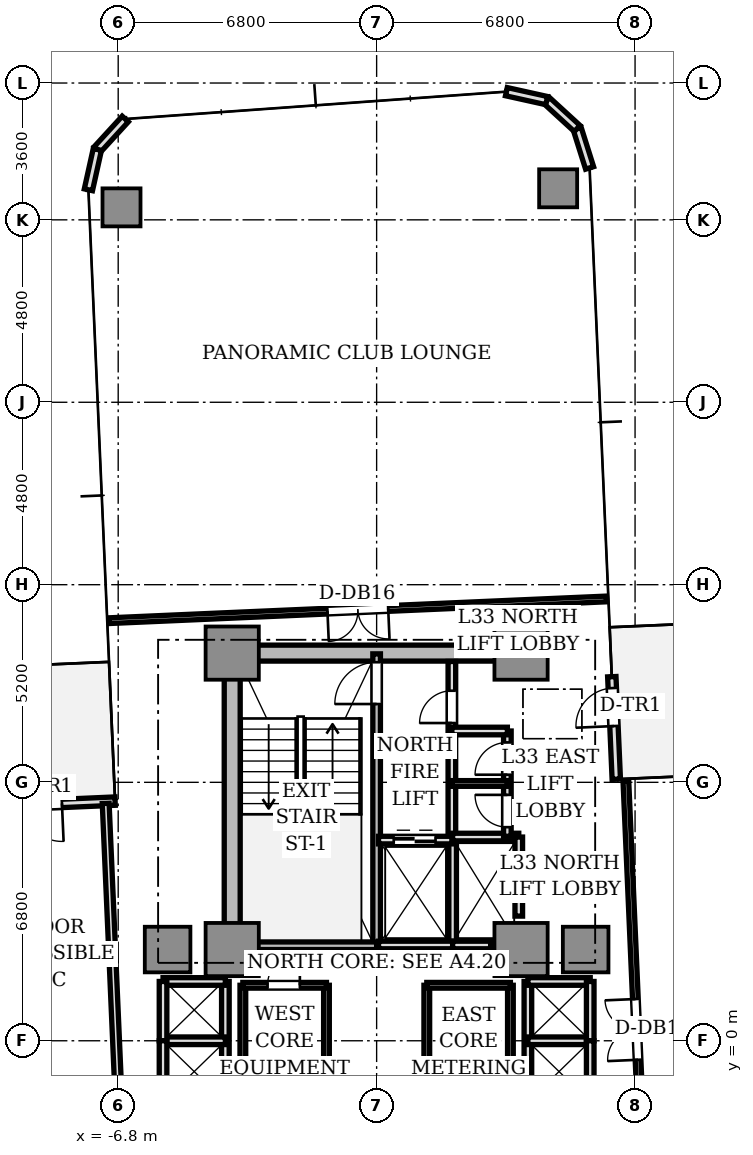
"""IFC4 building model, lengths in metres.
Left out: names, types, materials, properties, quantities, classifications, styles, units other than length and angle.
Written with IfcOpenShell. Run it as: python <this file> out.ifc"""

import sys

from ifc_helpers import new_model, si_unit, direction, frame, frame_2d, origin, origin_2d, place, context, subcontext, project, spatial, rectangle, extrude, source, transform, mapped, element, fill, save


model = new_model("IFC4")
c1 = context("Model", 3, precision=1e-05, world=origin(), true_north=direction((0.0, 1.0)))
c2 = subcontext(c1, "Body", "Model", "MODEL_VIEW")
j1 = project(units=[si_unit("LENGTHUNIT", "METRE"), si_unit("PLANEANGLEUNIT", "RADIAN")], contexts=[c1])
p1 = place(None, origin())
s1 = spatial("IfcSite", under=j1, at=p1, CompositionType="ELEMENT")
p2 = place(p1, origin())
s2 = spatial("IfcBuilding", under=s1, at=p2, CompositionType="ELEMENT")
p3 = place(p2, frame((0.0, 0.0, 121.5)))
s3 = spatial("IfcBuildingStorey", under=s2, at=p3, CompositionType="ELEMENT", Elevation=121.5)
p4 = place(p3, frame((-3.55, 10.2, 0.0), z_axis=(0.0, 0.0, 1.0), x_axis=(1.0, 0.0, 0.0)))
e1 = element("IfcWall", 1, at=p4, inside=s3, PredefinedType="SHEAR", context=c2, shape_type="SweptSolid", body=[
    extrude(rectangle(XDim=7.1, YDim=0.42, at=frame_2d((3.55, 0.0))), origin(), (0.0, 0.0, 1.0), 3.11),
])
p5 = place(p3, frame((-3.8, 2.85, 0.0), z_axis=(0.0, 0.0, 1.0), x_axis=(0.0, 1.0, 0.0)))
e2 = element("IfcWall", 2, at=p5, inside=s3, PredefinedType="SHEAR", context=c2, shape_type="SweptSolid", body=[
    extrude(rectangle(XDim=6.9, YDim=0.42, at=frame_2d((3.45, 0.0))), origin(), (0.0, 0.0, 1.0), 3.11),
])
m1 = source(origin(), c2, "Body", "SweptSolid", [
    extrude(rectangle(XDim=1.4, YDim=1.4, at=origin_2d()), origin(), (0.0, 0.0, 1.0), 3.11),
])
for number, where, z_axis, x_axis in (
    (3, (-3.8, 2.4, 0.0), (0.0, 0.0, 1.0), (1.0, 0.0, 0.0)),
    (4, (3.8, 2.4, 0.0), (0.0, 0.0, 1.0), (1.0, 0.0, 0.0)),
    (5, (-3.8, 10.2, 0.0), (0.0, 0.0, 1.0), (1.0, 0.0, 0.0)),
    (6, (3.8, 10.2, 0.0), (0.0, 0.0, 1.0), (1.0, 0.0, 0.0)),
):
    element("IfcColumn", number, at=place(p3, frame(where, z_axis=z_axis, x_axis=x_axis)), inside=s3, PredefinedType="COLUMN", context=c2, shape_type="MappedRepresentation", body=[
        mapped(m1, transform((0.0, 0.0, 0.0), scale=1.0)),
    ])
m2 = source(origin(), c2, "Body", "SweptSolid", [
    extrude(rectangle(XDim=1.2, YDim=1.2, at=origin_2d()), origin(), (0.0, 0.0, 1.0), 3.11),
])
for number, where, z_axis, x_axis in (
    (7, (5.5, 2.4, 0.0), (0.0, 0.0, 1.0), (1.0, 0.0, 0.0)),
    (8, (-5.5, 2.4, 0.0), (0.0, 0.0, 1.0), (1.0, 0.0, 0.0)),
):
    element("IfcColumn", number, at=place(p3, frame(where, z_axis=z_axis, x_axis=x_axis)), inside=s3, PredefinedType="COLUMN", context=c2, shape_type="MappedRepresentation", body=[
        mapped(m2, transform((0.0, 0.0, 0.0), scale=1.0)),
    ])
m3 = source(origin(), c2, "Body", "SweptSolid", [
    extrude(rectangle(XDim=1.0, YDim=1.0, at=origin_2d()), origin(), (0.0, 0.0, 1.0), 3.11),
])
for number, where, z_axis, x_axis in (
    (9, (4.776, 22.43, 0.0), (0.0, 0.0, 1.0), (1.0, 0.0, 0.0)),
    (10, (-6.713, 21.928, 0.0), (0.0, 0.0, 1.0), (1.0, 0.0, 0.0)),
):
    element("IfcColumn", number, at=place(p3, frame(where, z_axis=z_axis, x_axis=x_axis)), inside=s3, PredefinedType="COLUMN", context=c2, shape_type="MappedRepresentation", body=[
        mapped(m3, transform((0.0, 0.0, 0.0), scale=1.0)),
    ])
p6 = place(p3, frame((6.306, 6.882, 0.0), z_axis=(0.0, 0.0, 1.0), x_axis=(-0.043672655174, 0.999045894436, 0.0)))
e11 = element("IfcWall", 11, at=p6, inside=s3, PredefinedType="STANDARD", context=c2, shape_type="SweptSolid", body=[
    extrude(rectangle(XDim=2.7, YDim=0.22, at=frame_2d((1.35, 0.0))), origin(), (0.0, 0.0, 1.0), 3.11),
])
p7 = place(p6, frame((1.4, 0.0, 0.0)))
e12 = element("IfcOpeningElement", 12, at=p7, cuts=e11, PredefinedType="OPENING", context=c2, shape_type="SweptSolid", body=[
    extrude(rectangle(XDim=1.0, YDim=2.2, at=frame_2d((0.5, 1.1))), frame((0.0, 0.12, 0.0), z_axis=(0.0, -1.0, 0.0), x_axis=(1.0, 0.0, 0.0)), (0.0, 0.0, 1.0), 0.24),
])
p8 = place(p3, frame((5.604, 22.966, 0.0), z_axis=(0.0, 0.0, 1.0), x_axis=(-0.300755105707, 0.953701403161, 0.0)))
e13 = element("IfcWall", 13, at=p8, inside=s3, PredefinedType="STANDARD", context=c2, shape_type="SweptSolid", body=[
    extrude(rectangle(XDim=1.087, YDim=0.22, at=frame_2d((0.543, 0.0))), origin(), (0.0, 0.0, 1.0), 3.11),
])
p9 = place(p3, frame((5.277, 24.003, 0.0), z_axis=(0.0, 0.0, 1.0), x_axis=(-0.737312600672, 0.675551721847, 0.0)))
e14 = element("IfcWall", 14, at=p9, inside=s3, PredefinedType="STANDARD", context=c2, shape_type="SweptSolid", body=[
    extrude(rectangle(XDim=1.087, YDim=0.22, at=frame_2d((0.543, 0.0))), origin(), (0.0, 0.0, 1.0), 3.11),
])
for number, where, z_axis, x_axis in (
    (15, (4.475, 24.737, 0.0), (0.0, 0.0, 1.0), (-0.976, 0.217, 0.0)),
    (16, (-6.614, 24.253, 0.0), (0.0, 0.0, 1.0), (-0.676, -0.737, 0.0)),
):
    element("IfcWall", number, at=place(p3, frame(where, z_axis=z_axis, x_axis=x_axis)), inside=s3, PredefinedType="STANDARD", context=c2, shape_type="SweptSolid", body=[
        extrude(rectangle(XDim=1.087, YDim=0.22, at=frame_2d((0.543, 0.0))), origin(), (0.0, 0.0, 1.0), 3.11),
    ])
p10 = place(p3, frame((-7.349, 23.452, 0.0), z_axis=(0.0, 0.0, 1.0), x_axis=(-0.216454939174, -0.976292609471, 0.0)))
e17 = element("IfcWall", 17, at=p10, inside=s3, PredefinedType="STANDARD", context=c2, shape_type="SweptSolid", body=[
    extrude(rectangle(XDim=1.087, YDim=0.22, at=frame_2d((0.544, 0.0))), origin(), (0.0, 0.0, 1.0), 3.11),
])
p11 = place(p3, frame((-6.882, 6.306, 0.0), z_axis=(0.0, 0.0, 1.0), x_axis=(-0.999045894436, -0.043672655174, 0.0)))
e18 = element("IfcWall", 18, at=p11, inside=s3, PredefinedType="STANDARD", context=c2, shape_type="SweptSolid", body=[
    extrude(rectangle(XDim=2.7, YDim=0.22, at=frame_2d((1.35, 0.0))), origin(), (0.0, 0.0, 1.0), 3.11),
])
p12 = place(p11, frame((1.4, 0.0, 0.0)))
e19 = element("IfcOpeningElement", 19, at=p12, cuts=e18, PredefinedType="OPENING", context=c2, shape_type="SweptSolid", body=[
    extrude(rectangle(XDim=1.0, YDim=2.2, at=frame_2d((0.5, 1.1))), frame((0.0, 0.12, 0.0), z_axis=(0.0, -1.0, 0.0), x_axis=(1.0, 0.0, 0.0)), (0.0, 0.0, 1.0), 0.24),
])
p13 = place(p3, frame((0.0, 2.5, 0.0), z_axis=(0.0, 0.0, 1.0), x_axis=(0.0, 1.0, 0.0)))
e20 = element("IfcWall", 20, at=p13, inside=s3, PredefinedType="SOLIDWALL", context=c2, shape_type="SweptSolid", body=[
    extrude(rectangle(XDim=7.68, YDim=0.2, at=frame_2d((3.84, 0.0))), origin(), (0.0, 0.0, 1.0), 3.11),
])
p14 = place(p13, frame((6.36, 0.0, 0.0)))
e21 = element("IfcOpeningElement", 21, at=p14, cuts=e20, PredefinedType="OPENING", context=c2, shape_type="SweptSolid", body=[
    extrude(rectangle(XDim=1.1, YDim=2.15, at=frame_2d((0.55, 1.075))), frame((0.0, 0.11, 0.0), z_axis=(0.0, -1.0, 0.0), x_axis=(1.0, 0.0, 0.0)), (0.0, 0.0, 1.0), 0.22),
])
p15 = place(p3, frame((-3.72, 2.5, 0.0), z_axis=(0.0, 0.0, 1.0), x_axis=(1.0, 0.0, 0.0)))
e22 = element("IfcWall", 22, at=p15, inside=s3, PredefinedType="SOLIDWALL", context=c2, shape_type="SweptSolid", body=[
    extrude(rectangle(XDim=3.72, YDim=0.2, at=frame_2d((1.86, 0.0))), origin(), (0.0, 0.0, 1.0), 3.11),
])
p16 = place(p3, frame((1.98, 5.32, 0.0), z_axis=(0.0, 0.0, 1.0), x_axis=(0.0, 1.0, 0.0)))
e23 = element("IfcWall", 23, at=p16, inside=s3, PredefinedType="SOLIDWALL", context=c2, shape_type="SweptSolid", body=[
    extrude(rectangle(XDim=4.66, YDim=0.2, at=frame_2d((2.33, 0.0))), origin(), (0.0, 0.0, 1.0), 2.66),
])
p17 = place(p16, frame((3.04, 0.0, 0.0)))
e24 = element("IfcOpeningElement", 24, at=p17, cuts=e23, PredefinedType="OPENING", context=c2, shape_type="SweptSolid", body=[
    extrude(rectangle(XDim=0.85, YDim=2.1, at=frame_2d((0.425, 1.05))), frame((0.0, 0.11, 0.0), z_axis=(0.0, -1.0, 0.0), x_axis=(1.0, 0.0, 0.0)), (0.0, 0.0, 1.0), 0.22),
])
p18 = place(p3, frame((2.0, 2.5, 0.0), z_axis=(0.0, 0.0, 1.0), x_axis=(0.0, 1.0, 0.0)))
e25 = element("IfcWall", 25, at=p18, inside=s3, PredefinedType="SOLIDWALL", context=c2, shape_type="SweptSolid", body=[
    extrude(rectangle(XDim=2.78, YDim=0.2, at=frame_2d((1.39, 0.0))), origin(), (0.0, 0.0, 1.0), 2.66),
])
p19 = place(p3, frame((0.05, 2.52, 0.0), z_axis=(0.0, 0.0, 1.0), x_axis=(1.0, 0.0, 0.0)))
e26 = element("IfcWall", 26, at=p19, inside=s3, PredefinedType="SOLIDWALL", context=c2, shape_type="SweptSolid", body=[
    extrude(rectangle(XDim=1.95, YDim=0.2, at=frame_2d((0.975, 0.0))), origin(), (0.0, 0.0, 1.0), 2.66),
])
p20 = place(p3, frame((0.05, 5.28, 0.0), z_axis=(0.0, 0.0, 1.0), x_axis=(1.0, 0.0, 0.0)))
e27 = element("IfcWall", 27, at=p20, inside=s3, PredefinedType="SOLIDWALL", context=c2, shape_type="SweptSolid", body=[
    extrude(rectangle(XDim=1.93, YDim=0.2, at=frame_2d((0.965, 0.0))), origin(), (0.0, 0.0, 1.0), 2.66),
])
p21 = place(p20, frame((0.4, 0.0, 0.0)))
e28 = element("IfcOpeningElement", 28, at=p21, cuts=e27, PredefinedType="OPENING", context=c2, shape_type="SweptSolid", body=[
    extrude(rectangle(XDim=1.1, YDim=2.2, at=frame_2d((0.55, 1.1))), frame((0.0, 0.11, 0.0), z_axis=(0.0, -1.0, 0.0), x_axis=(1.0, 0.0, 0.0)), (0.0, 0.0, 1.0), 0.22),
])
p22 = place(p3, frame((2.0, 2.52, 0.0), z_axis=(0.0, 0.0, 1.0), x_axis=(1.0, 0.0, 0.0)))
e29 = element("IfcWall", 29, at=p22, inside=s3, PredefinedType="SOLIDWALL", context=c2, shape_type="SweptSolid", body=[
    extrude(rectangle(XDim=1.0, YDim=0.2, at=frame_2d((0.5, 0.0))), origin(), (0.0, 0.0, 1.0), 2.66),
])
p23 = place(p3, frame((2.0, 5.36, 0.0), z_axis=(0.0, 0.0, 1.0), x_axis=(1.0, 0.0, 0.0)))
e30 = element("IfcWall", 30, at=p23, inside=s3, PredefinedType="SOLIDWALL", context=c2, shape_type="SweptSolid", body=[
    extrude(rectangle(XDim=1.74, YDim=0.2, at=frame_2d((0.87, 0.0))), origin(), (0.0, 0.0, 1.0), 2.66),
])
p24 = place(p3, frame((3.74, 3.28, 0.0), z_axis=(0.0, 0.0, 1.0), x_axis=(0.0, 1.0, 0.0)))
e31 = element("IfcWall", 31, at=p24, inside=s3, PredefinedType="SOLIDWALL", context=c2, shape_type="SweptSolid", body=[
    extrude(rectangle(XDim=2.08, YDim=0.2, at=frame_2d((1.04, 0.0))), origin(), (0.0, 0.0, 1.0), 2.66),
])
p25 = place(p24, frame((0.44, 0.0, 0.0)))
e32 = element("IfcOpeningElement", 32, at=p25, cuts=e31, PredefinedType="OPENING", context=c2, shape_type="SweptSolid", body=[
    extrude(rectangle(XDim=1.2, YDim=2.2, at=frame_2d((0.6, 1.1))), frame((0.0, 0.11, 0.0), z_axis=(0.0, -1.0, 0.0), x_axis=(1.0, 0.0, 0.0)), (0.0, 0.0, 1.0), 0.22),
])
p26 = place(p3, frame((3.98, -1.56, 0.0), z_axis=(0.0, 0.0, 1.0), x_axis=(0.0, 1.0, 0.0)))
e33 = element("IfcWall", 33, at=p26, inside=s3, PredefinedType="SOLIDWALL", context=c2, shape_type="SweptSolid", body=[
    extrude(rectangle(XDim=3.12, YDim=0.2, at=frame_2d((1.56, 0.0))), origin(), (0.0, 0.0, 1.0), 2.28),
])
for number, where, z_axis, x_axis in (
    (34, (3.98, 1.56, 0.0), (0.0, 0.0, 1.0), (1.0, 0.0, 0.0)),
    (35, (3.98, 0.0, 0.0), (0.0, 0.0, 1.0), (1.0, 0.0, 0.0)),
):
    element("IfcWall", number, at=place(p3, frame(where, z_axis=z_axis, x_axis=x_axis)), inside=s3, PredefinedType="SOLIDWALL", context=c2, shape_type="SweptSolid", body=[
        extrude(rectangle(XDim=1.64, YDim=0.2, at=frame_2d((0.82, 0.0))), origin(), (0.0, 0.0, 1.0), 2.66),
    ])
for number, where, z_axis, x_axis in (
    (36, (5.62, 0.0, 0.0), (0.0, 0.0, 1.0), (0.0, 1.0, 0.0)),
    (37, (5.62, -1.56, 0.0), (0.0, 0.0, 1.0), (0.0, 1.0, 0.0)),
):
    element("IfcWall", number, at=place(p3, frame(where, z_axis=z_axis, x_axis=x_axis)), inside=s3, PredefinedType="SOLIDWALL", context=c2, shape_type="SweptSolid", body=[
        extrude(rectangle(XDim=1.56, YDim=0.2, at=frame_2d((0.78, 0.0))), origin(), (0.0, 0.0, 1.0), 2.66),
    ])
p27 = place(p3, frame((-3.98, -1.56, 0.0), z_axis=(0.0, 0.0, 1.0), x_axis=(0.0, 1.0, 0.0)))
e38 = element("IfcWall", 38, at=p27, inside=s3, PredefinedType="SOLIDWALL", context=c2, shape_type="SweptSolid", body=[
    extrude(rectangle(XDim=3.12, YDim=0.2, at=frame_2d((1.56, 0.0))), origin(), (0.0, 0.0, 1.0), 2.28),
])
for number, where, z_axis, x_axis in (
    (39, (-5.62, 1.56, 0.0), (0.0, 0.0, 1.0), (1.0, 0.0, 0.0)),
    (40, (-5.62, 0.0, 0.0), (0.0, 0.0, 1.0), (1.0, 0.0, 0.0)),
):
    element("IfcWall", number, at=place(p3, frame(where, z_axis=z_axis, x_axis=x_axis)), inside=s3, PredefinedType="SOLIDWALL", context=c2, shape_type="SweptSolid", body=[
        extrude(rectangle(XDim=1.64, YDim=0.2, at=frame_2d((0.82, 0.0))), origin(), (0.0, 0.0, 1.0), 2.66),
    ])
for number, where, z_axis, x_axis in (
    (41, (-5.62, 0.0, 0.0), (0.0, 0.0, 1.0), (0.0, 1.0, 0.0)),
    (42, (-5.62, -1.56, 0.0), (0.0, 0.0, 1.0), (0.0, 1.0, 0.0)),
):
    element("IfcWall", number, at=place(p3, frame(where, z_axis=z_axis, x_axis=x_axis)), inside=s3, PredefinedType="SOLIDWALL", context=c2, shape_type="SweptSolid", body=[
        extrude(rectangle(XDim=1.56, YDim=0.2, at=frame_2d((0.78, 0.0))), origin(), (0.0, 0.0, 1.0), 2.66),
    ])
p28 = place(p3, frame((3.44, 5.38, 0.0), z_axis=(0.0, 0.0, 1.0), x_axis=(0.0, 1.0, 0.0)))
e43 = element("IfcWall", 43, at=p28, inside=s3, PredefinedType="SOLIDWALL", context=c2, shape_type="SweptSolid", body=[
    extrude(rectangle(XDim=2.77, YDim=0.2, at=frame_2d((1.385, 0.0))), origin(), (0.0, 0.0, 1.0), 2.66),
])
p29 = place(p28, frame((0.24, 0.0, 0.0)))
e44 = element("IfcOpeningElement", 44, at=p29, cuts=e43, PredefinedType="OPENING", context=c2, shape_type="SweptSolid", body=[
    extrude(rectangle(XDim=0.85, YDim=2.1, at=frame_2d((0.425, 1.05))), frame((0.0, 0.11, 0.0), z_axis=(0.0, -1.0, 0.0), x_axis=(1.0, 0.0, 0.0)), (0.0, 0.0, 1.0), 0.22),
])
p30 = place(p28, frame((1.62, 0.0, 0.0)))
e45 = element("IfcOpeningElement", 45, at=p30, cuts=e43, PredefinedType="OPENING", context=c2, shape_type="SweptSolid", body=[
    extrude(rectangle(XDim=0.85, YDim=2.1, at=frame_2d((0.425, 1.05))), frame((0.0, 0.11, 0.0), z_axis=(0.0, -1.0, 0.0), x_axis=(1.0, 0.0, 0.0)), (0.0, 0.0, 1.0), 0.22),
])
p31 = place(p3, frame((1.98, 8.15, 0.0), z_axis=(0.0, 0.0, 1.0), x_axis=(1.0, 0.0, 0.0)))
e46 = element("IfcWall", 46, at=p31, inside=s3, PredefinedType="SOLIDWALL", context=c2, shape_type="SweptSolid", body=[
    extrude(rectangle(XDim=1.46, YDim=0.2, at=frame_2d((0.73, 0.0))), origin(), (0.0, 0.0, 1.0), 2.66),
])
p32 = place(p3, frame((1.98, 6.77, 0.0), z_axis=(0.0, 0.0, 1.0), x_axis=(1.0, 0.0, 0.0)))
e47 = element("IfcWall", 47, at=p32, inside=s3, PredefinedType="PARTITIONING", context=c2, shape_type="SweptSolid", body=[
    extrude(rectangle(XDim=1.46, YDim=0.15, at=frame_2d((0.73, 0.0))), origin(), (0.0, 0.0, 1.0), 2.66),
])
p33 = place(p3, frame((-1.32, -1.46, 0.0), z_axis=(0.0, 0.0, 1.0), x_axis=(0.0, 1.0, 0.0)))
e48 = element("IfcWall", 48, at=p33, inside=s3, PredefinedType="PARTITIONING", context=c2, shape_type="SweptSolid", body=[
    extrude(rectangle(XDim=2.92, YDim=0.15, at=frame_2d((1.46, 0.0))), origin(), (0.0, 0.0, 1.0), 2.66),
])
p34 = place(p3, frame((-3.52, -1.46, 0.0), z_axis=(0.0, 0.0, 1.0), x_axis=(0.0, 1.0, 0.0)))
e49 = element("IfcWall", 49, at=p34, inside=s3, PredefinedType="PARTITIONING", context=c2, shape_type="SweptSolid", body=[
    extrude(rectangle(XDim=2.92, YDim=0.15, at=frame_2d((1.46, 0.0))), origin(), (0.0, 0.0, 1.0), 2.28),
])
p35 = place(p3, frame((-3.52, 1.46, 0.0), z_axis=(0.0, 0.0, 1.0), x_axis=(1.0, 0.0, 0.0)))
e50 = element("IfcWall", 50, at=p35, inside=s3, PredefinedType="PARTITIONING", context=c2, shape_type="SweptSolid", body=[
    extrude(rectangle(XDim=2.2, YDim=0.15, at=frame_2d((1.1, 0.0))), origin(), (0.0, 0.0, 1.0), 2.66),
])
p36 = place(p35, frame((0.65, 0.0, 0.0)))
e51 = element("IfcOpeningElement", 51, at=p36, cuts=e50, PredefinedType="OPENING", context=c2, shape_type="SweptSolid", body=[
    extrude(rectangle(XDim=0.85, YDim=2.1, at=frame_2d((0.425, 1.05))), frame((0.0, 0.085, 0.0), z_axis=(0.0, -1.0, 0.0), x_axis=(1.0, 0.0, 0.0)), (0.0, 0.0, 1.0), 0.17),
])
p37 = place(p3, frame((1.32, -1.46, 0.0), z_axis=(0.0, 0.0, 1.0), x_axis=(0.0, 1.0, 0.0)))
e52 = element("IfcWall", 52, at=p37, inside=s3, PredefinedType="PARTITIONING", context=c2, shape_type="SweptSolid", body=[
    extrude(rectangle(XDim=2.92, YDim=0.15, at=frame_2d((1.46, 0.0))), origin(), (0.0, 0.0, 1.0), 2.66),
])
p38 = place(p3, frame((3.52, -1.46, 0.0), z_axis=(0.0, 0.0, 1.0), x_axis=(0.0, 1.0, 0.0)))
e53 = element("IfcWall", 53, at=p38, inside=s3, PredefinedType="PARTITIONING", context=c2, shape_type="SweptSolid", body=[
    extrude(rectangle(XDim=2.92, YDim=0.15, at=frame_2d((1.46, 0.0))), origin(), (0.0, 0.0, 1.0), 2.28),
])
p39 = place(p3, frame((1.32, 1.46, 0.0), z_axis=(0.0, 0.0, 1.0), x_axis=(1.0, 0.0, 0.0)))
e54 = element("IfcWall", 54, at=p39, inside=s3, PredefinedType="PARTITIONING", context=c2, shape_type="SweptSolid", body=[
    extrude(rectangle(XDim=2.2, YDim=0.15, at=frame_2d((1.1, 0.0))), origin(), (0.0, 0.0, 1.0), 2.66),
])
p40 = place(p3, frame((7.129, -6.245, 0.0), z_axis=(0.0, 0.0, 1.0), x_axis=(-0.043609488494, 0.999048653727, 0.0)))
e55 = element("IfcWall", 55, at=p40, inside=s3, PredefinedType="PARTITIONING", context=c2, shape_type="SweptSolid", body=[
    extrude(rectangle(XDim=13.1, YDim=0.15, at=frame_2d((6.55, 0.0))), origin(), (0.0, 0.0, 1.0), 2.66),
])
p41 = place(p40, frame((5.75, 0.0, 0.0)))
e56 = element("IfcOpeningElement", 56, at=p41, cuts=e55, PredefinedType="OPENING", context=c2, shape_type="SweptSolid", body=[
    extrude(rectangle(XDim=1.6, YDim=2.25, at=frame_2d((0.8, 1.125))), frame((0.0, 0.085, 0.0), z_axis=(0.0, -1.0, 0.0), x_axis=(1.0, 0.0, 0.0)), (0.0, 0.0, 1.0), 0.17),
])
p42 = place(p3, frame((6.049, 11.625, 0.0), z_axis=(0.0, 0.0, 1.0), x_axis=(-0.999047806124, -0.043628901879, 0.0)))
e57 = element("IfcWall", 57, at=p42, inside=s3, PredefinedType="PARTITIONING", context=c2, shape_type="SweptSolid", body=[
    extrude(rectangle(XDim=13.1, YDim=0.15, at=frame_2d((6.55, 0.0))), origin(), (0.0, 0.0, 1.0), 2.66),
])
p43 = place(p42, frame((5.75, 0.0, 0.0)))
e58 = element("IfcOpeningElement", 58, at=p43, cuts=e57, PredefinedType="OPENING", context=c2, shape_type="SweptSolid", body=[
    extrude(rectangle(XDim=1.6, YDim=2.25, at=frame_2d((0.8, 1.125))), frame((0.0, 0.085, 0.0), z_axis=(0.0, -1.0, 0.0), x_axis=(1.0, 0.0, 0.0)), (0.0, 0.0, 1.0), 0.17),
])
p44 = place(p3, frame((-7.129, 6.245, 0.0), z_axis=(0.0, 0.0, 1.0), x_axis=(0.043600217373, -0.999049058378, 0.0)))
e59 = element("IfcWall", 59, at=p44, inside=s3, PredefinedType="PARTITIONING", context=c2, shape_type="SweptSolid", body=[
    extrude(rectangle(XDim=7.8, YDim=0.18, at=frame_2d((3.9, 0.0))), origin(), (0.0, 0.0, 1.0), 2.66),
])
m4 = source(origin(), c2, "Body", "SweptSolid", [
    extrude(rectangle(XDim=1.0, YDim=0.05, at=origin_2d()), origin(), (0.0, 0.0, 1.0), 2.2),
])
p45 = place(p7, frame((0.5, 0.0, 0.0)))
e60 = element("IfcDoor", 60, at=p45, inside=s3, OperationType="SINGLE_SWING_LEFT", PredefinedType="DOOR", context=c2, shape_type="MappedRepresentation", body=[
    mapped(m4, transform((0.0, 0.0, 0.0), scale=1.0)),
])
fill(e12, e60)
p46 = place(p12, frame((0.5, 0.0, 0.0)))
e61 = element("IfcDoor", 61, at=p46, inside=s3, OperationType="SINGLE_SWING_LEFT", PredefinedType="DOOR", context=c2, shape_type="MappedRepresentation", body=[
    mapped(m4, transform((0.0, 0.0, 0.0), scale=1.0)),
])
fill(e19, e61)
m5 = source(origin(), c2, "Body", "SweptSolid", [
    extrude(rectangle(XDim=1.1, YDim=0.05, at=origin_2d()), origin(), (0.0, 0.0, 1.0), 2.15),
])
p47 = place(p14, frame((0.55, 0.0, 0.0)))
e62 = element("IfcDoor", 62, at=p47, inside=s3, OperationType="SINGLE_SWING_LEFT", PredefinedType="DOOR", context=c2, shape_type="MappedRepresentation", body=[
    mapped(m5, transform((0.0, 0.0, 0.0), scale=1.0)),
])
fill(e21, e62)
m6 = source(origin(), c2, "Body", "SweptSolid", [
    extrude(rectangle(XDim=0.85, YDim=0.05, at=origin_2d()), origin(), (0.0, 0.0, 1.0), 2.1),
])
p48 = place(p17, frame((0.425, 0.0, 0.0)))
e63 = element("IfcDoor", 63, at=p48, inside=s3, OperationType="SINGLE_SWING_LEFT", PredefinedType="DOOR", context=c2, shape_type="MappedRepresentation", body=[
    mapped(m6, transform((0.0, 0.0, 0.0), scale=1.0)),
])
fill(e24, e63)
m7 = source(origin(), c2, "Body", "SweptSolid", [
    extrude(rectangle(XDim=1.1, YDim=0.05, at=origin_2d()), origin(), (0.0, 0.0, 1.0), 2.2),
])
p49 = place(p21, frame((0.55, 0.0, 0.0)))
e64 = element("IfcDoor", 64, at=p49, inside=s3, OperationType="DOUBLE_DOOR_SLIDING", PredefinedType="DOOR", context=c2, shape_type="MappedRepresentation", body=[
    mapped(m7, transform((0.0, 0.0, 0.0), scale=1.0)),
])
fill(e28, e64)
m8 = source(origin(), c2, "Body", "SweptSolid", [
    extrude(rectangle(XDim=1.2, YDim=0.05, at=origin_2d()), origin(), (0.0, 0.0, 1.0), 2.2),
])
p50 = place(p25, frame((0.6, 0.0, 0.0)))
e65 = element("IfcDoor", 65, at=p50, inside=s3, OperationType="DOUBLE_DOOR_SLIDING", PredefinedType="DOOR", context=c2, shape_type="MappedRepresentation", body=[
    mapped(m8, transform((0.0, 0.0, 0.0), scale=1.0)),
])
fill(e32, e65)
p51 = place(p29, frame((0.425, 0.0, 0.0)))
e66 = element("IfcDoor", 66, at=p51, inside=s3, OperationType="SINGLE_SWING_RIGHT", PredefinedType="DOOR", context=c2, shape_type="MappedRepresentation", body=[
    mapped(m6, transform((0.0, 0.0, 0.0), scale=1.0)),
])
fill(e44, e66)
p52 = place(p30, frame((0.425, 0.0, 0.0)))
e67 = element("IfcDoor", 67, at=p52, inside=s3, OperationType="SINGLE_SWING_LEFT", PredefinedType="DOOR", context=c2, shape_type="MappedRepresentation", body=[
    mapped(m6, transform((0.0, 0.0, 0.0), scale=1.0)),
])
fill(e45, e67)
p53 = place(p36, frame((0.425, 0.0, 0.0)))
e68 = element("IfcDoor", 68, at=p53, inside=s3, OperationType="SINGLE_SWING_RIGHT", PredefinedType="DOOR", context=c2, shape_type="MappedRepresentation", body=[
    mapped(m6, transform((0.0, 0.0, 0.0), scale=1.0)),
])
fill(e51, e68)
m9 = source(origin(), c2, "Body", "SweptSolid", [
    extrude(rectangle(XDim=1.6, YDim=0.05, at=origin_2d()), origin(), (0.0, 0.0, 1.0), 2.25),
])
p54 = place(p41, frame((0.8, 0.0, 0.0)))
e69 = element("IfcDoor", 69, at=p54, inside=s3, OperationType="DOUBLE_DOOR_SINGLE_SWING", PredefinedType="DOOR", context=c2, shape_type="MappedRepresentation", body=[
    mapped(m9, transform((0.0, 0.0, 0.0), scale=1.0)),
])
fill(e56, e69)
p55 = place(p43, frame((0.8, 0.0, 0.0)))
e70 = element("IfcDoor", 70, at=p55, inside=s3, OperationType="DOUBLE_DOOR_SINGLE_SWING", PredefinedType="DOOR", context=c2, shape_type="MappedRepresentation", body=[
    mapped(m9, transform((0.0, 0.0, 0.0), scale=1.0)),
])
fill(e58, e70)
save(model, sys.argv[1])
